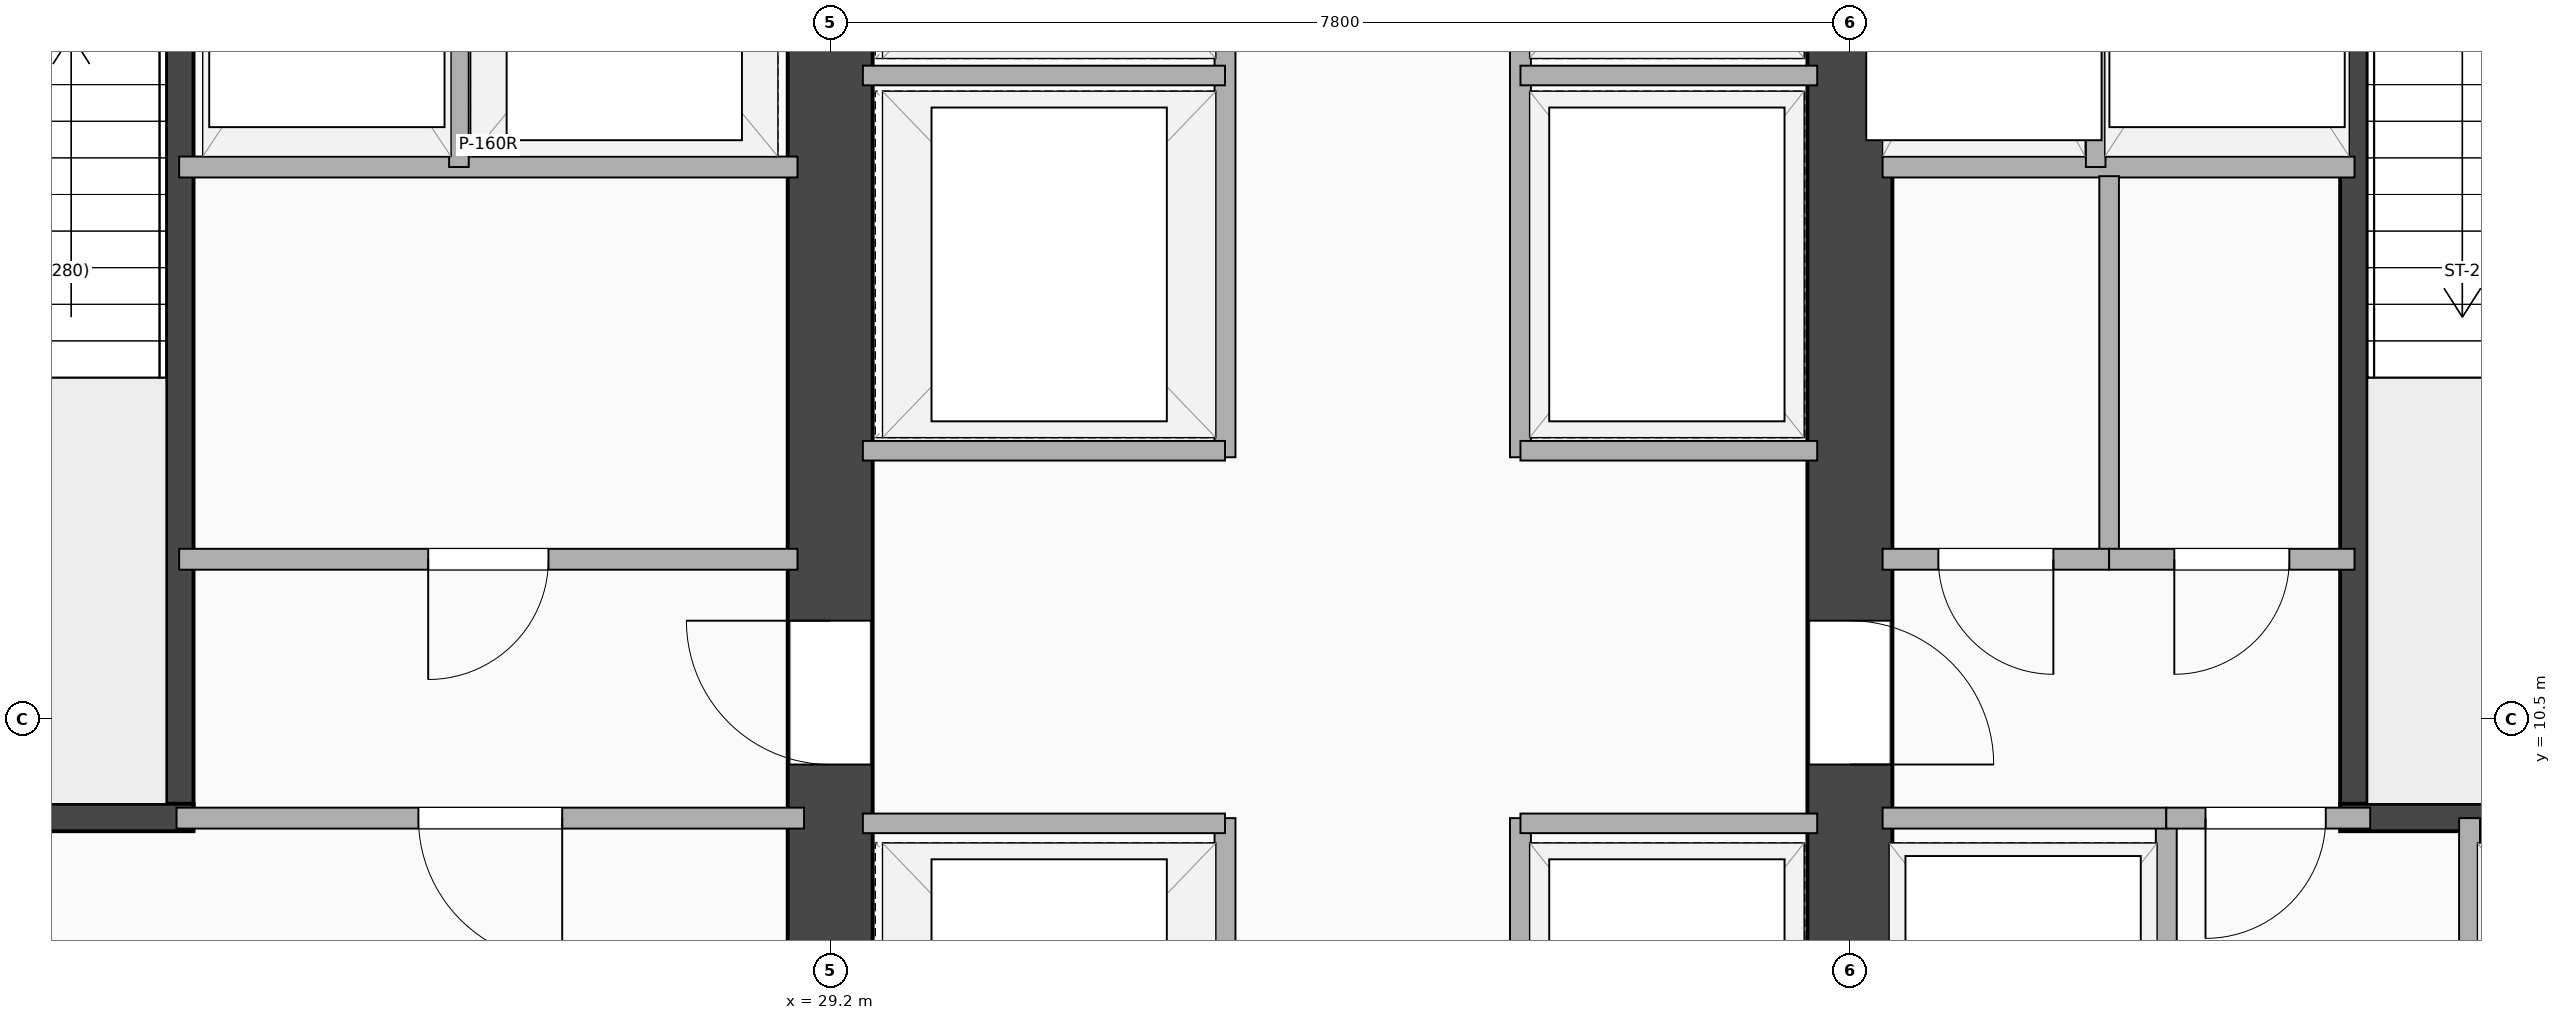
"""IFC4 building model, lengths in metres.
Left out: names, types, materials, properties, quantities, classifications, styles, units other than length and angle.
Written with IfcOpenShell. Run it as: python <this file> out.ifc"""

import sys

from ifc_helpers import new_model, si_unit, direction, frame, frame_2d, origin, place, context, subcontext, project, spatial, rectangle, extrude, element, fill, save


model = new_model("IFC4")
c1 = context("Model", 3, precision=1e-05, world=origin(), true_north=direction((0.0, 1.0)))
c2 = subcontext(c1, "Body", "Model", "MODEL_VIEW")
j1 = project(units=[si_unit("LENGTHUNIT", "METRE"), si_unit("PLANEANGLEUNIT", "RADIAN")], contexts=[c1])
p1 = place(None, origin())
s1 = spatial("IfcSite", under=j1, at=p1, CompositionType="ELEMENT")
p2 = place(p1, origin())
s2 = spatial("IfcBuilding", under=s1, at=p2, CompositionType="ELEMENT")
p3 = place(p2, frame((0.0, 0.0, 75.4)))
s3 = spatial("IfcBuildingStorey", under=s2, at=p3, CompositionType="ELEMENT", Elevation=75.4)
p4 = place(p3, frame((29.2, 3.5, 0.0), z_axis=(0.0, 0.0, 1.0), x_axis=(0.0, 1.0, 0.0)))
e1 = element("IfcWall", 1, at=p4, inside=s3, PredefinedType="SHEAR", context=c2, shape_type="SweptSolid", body=[
    extrude(rectangle(XDim=16.9, YDim=0.65, at=frame_2d((8.45, 0.0))), origin(), (0.0, 0.0, 1.0), 8.14),
])
p5 = place(p4, frame((7.75, 0.0, 0.0), z_axis=(0.0, 0.0, 1.0), x_axis=(-1.0, 0.0, 0.0)))
e2 = element("IfcOpeningElement", 2, at=p5, cuts=e1, PredefinedType="OPENING", context=c2, shape_type="SweptSolid", body=[
    extrude(rectangle(XDim=1.1, YDim=2.15, at=frame_2d((0.55, 1.075))), frame((0.0, 0.335, 0.0), z_axis=(0.0, -1.0, 0.0), x_axis=(1.0, 0.0, 0.0)), (0.0, 0.0, 1.0), 0.67),
])
p6 = place(p3, frame((37.0, 3.5, 0.0), z_axis=(0.0, 0.0, 1.0), x_axis=(0.0, 1.0, 0.0)))
e3 = element("IfcWall", 3, at=p6, inside=s3, PredefinedType="SHEAR", context=c2, shape_type="SweptSolid", body=[
    extrude(rectangle(XDim=16.9, YDim=0.65, at=frame_2d((8.45, 0.0))), origin(), (0.0, 0.0, 1.0), 8.14),
])
p7 = place(p6, frame((6.65, 0.0, 0.0)))
e4 = element("IfcOpeningElement", 4, at=p7, cuts=e3, PredefinedType="OPENING", context=c2, shape_type="SweptSolid", body=[
    extrude(rectangle(XDim=1.1, YDim=2.15, at=frame_2d((0.55, 1.075))), frame((0.0, 0.335, 0.0), z_axis=(0.0, -1.0, 0.0), x_axis=(1.0, 0.0, 0.0)), (0.0, 0.0, 1.0), 0.67),
])
p8 = place(p3, frame((24.225, 9.745, 0.0), z_axis=(0.0, 0.0, 1.0), x_axis=(0.0, 1.0, 0.0)))
e5 = element("IfcWall", 5, at=p8, inside=s3, PredefinedType="SHEAR", context=c2, shape_type="SweptSolid", body=[
    extrude(rectangle(XDim=8.01, YDim=0.21, at=frame_2d((4.005, 0.0))), origin(), (0.0, 0.0, 1.0), 8.14),
])
p9 = place(p3, frame((20.67, 9.745, 0.0), z_axis=(0.0, 0.0, 1.0), x_axis=(1.0, 0.0, 0.0)))
e6 = element("IfcWall", 6, at=p9, inside=s3, PredefinedType="SHEAR", context=c2, shape_type="SweptSolid", body=[
    extrude(rectangle(XDim=3.66, YDim=0.21, at=frame_2d((1.83, 0.0))), origin(), (0.0, 0.0, 1.0), 8.14),
])
p10 = place(p3, frame((40.855, 9.745, 0.0), z_axis=(0.0, 0.0, 1.0), x_axis=(0.0, 1.0, 0.0)))
e7 = element("IfcWall", 7, at=p10, inside=s3, PredefinedType="SHEAR", context=c2, shape_type="SweptSolid", body=[
    extrude(rectangle(XDim=8.01, YDim=0.21, at=frame_2d((4.005, 0.0))), origin(), (0.0, 0.0, 1.0), 8.14),
])
p11 = place(p3, frame((40.75, 9.745, 0.0), z_axis=(0.0, 0.0, 1.0), x_axis=(1.0, 0.0, 0.0)))
e8 = element("IfcWall", 8, at=p11, inside=s3, PredefinedType="SHEAR", context=c2, shape_type="SweptSolid", body=[
    extrude(rectangle(XDim=3.66, YDim=0.21, at=frame_2d((1.83, 0.0))), origin(), (0.0, 0.0, 1.0), 8.14),
])
p12 = place(p3, frame((24.22, 14.72, 0.0), z_axis=(0.0, 0.0, 1.0), x_axis=(1.0, 0.0, 0.0)))
e9 = element("IfcWall", 9, at=p12, inside=s3, PredefinedType="PARTITIONING", context=c2, shape_type="SweptSolid", body=[
    extrude(rectangle(XDim=4.73, YDim=0.16, at=frame_2d((2.365, 0.0))), origin(), (0.0, 0.0, 1.0), 8.14),
])
p13 = place(p3, frame((26.36, 14.72, 0.0), z_axis=(0.0, 0.0, 1.0), x_axis=(0.0, 1.0, 0.0)))
e10 = element("IfcWall", 10, at=p13, inside=s3, PredefinedType="PARTITIONING", context=c2, shape_type="SweptSolid", body=[
    extrude(rectangle(XDim=3.04, YDim=0.15, at=frame_2d((1.52, 0.0))), origin(), (0.0, 0.0, 1.0), 8.14),
])
p14 = place(p3, frame((37.25, 14.72, 0.0), z_axis=(0.0, 0.0, 1.0), x_axis=(1.0, 0.0, 0.0)))
e11 = element("IfcWall", 11, at=p14, inside=s3, PredefinedType="PARTITIONING", context=c2, shape_type="SweptSolid", body=[
    extrude(rectangle(XDim=3.61, YDim=0.16, at=frame_2d((1.805, 0.0))), origin(), (0.0, 0.0, 1.0), 8.14),
])
p15 = place(p3, frame((38.88, 14.72, 0.0), z_axis=(0.0, 0.0, 1.0), x_axis=(0.0, 1.0, 0.0)))
e12 = element("IfcWall", 12, at=p15, inside=s3, PredefinedType="PARTITIONING", context=c2, shape_type="SweptSolid", body=[
    extrude(rectangle(XDim=3.04, YDim=0.15, at=frame_2d((1.52, 0.0))), origin(), (0.0, 0.0, 1.0), 8.14),
])
p16 = place(p3, frame((24.22, 11.72, 0.0), z_axis=(0.0, 0.0, 1.0), x_axis=(1.0, 0.0, 0.0)))
e13 = element("IfcWall", 13, at=p16, inside=s3, PredefinedType="PARTITIONING", context=c2, shape_type="SweptSolid", body=[
    extrude(rectangle(XDim=4.73, YDim=0.16, at=frame_2d((2.365, 0.0))), origin(), (0.0, 0.0, 1.0), 8.14),
])
p17 = place(p16, frame((1.905, 0.0, 0.0)))
e14 = element("IfcOpeningElement", 14, at=p17, cuts=e13, PredefinedType="OPENING", context=c2, shape_type="SweptSolid", body=[
    extrude(rectangle(XDim=0.92, YDim=2.08, at=frame_2d((0.46, 1.04))), frame((0.0, 0.09, 0.0), z_axis=(0.0, -1.0, 0.0), x_axis=(1.0, 0.0, 0.0)), (0.0, 0.0, 1.0), 0.18),
])
p18 = place(p3, frame((38.983, 11.72, 0.0), z_axis=(0.0, 0.0, 1.0), x_axis=(0.0, 1.0, 0.0)))
e15 = element("IfcWall", 15, at=p18, inside=s3, PredefinedType="PARTITIONING", context=c2, shape_type="SweptSolid", body=[
    extrude(rectangle(XDim=2.93, YDim=0.15, at=frame_2d((1.465, 0.0))), origin(), (0.0, 0.0, 1.0), 8.14),
])
p19 = place(p3, frame((37.25, 11.72, 0.0), z_axis=(0.0, 0.0, 1.0), x_axis=(1.0, 0.0, 0.0)))
e16 = element("IfcWall", 16, at=p19, inside=s3, PredefinedType="PARTITIONING", context=c2, shape_type="SweptSolid", body=[
    extrude(rectangle(XDim=1.733, YDim=0.16, at=frame_2d((0.866, 0.0))), origin(), (0.0, 0.0, 1.0), 8.14),
])
p20 = place(p19, frame((0.427, 0.0, 0.0)))
e17 = element("IfcOpeningElement", 17, at=p20, cuts=e16, PredefinedType="OPENING", context=c2, shape_type="SweptSolid", body=[
    extrude(rectangle(XDim=0.88, YDim=2.08, at=frame_2d((0.44, 1.04))), frame((0.0, 0.09, 0.0), z_axis=(0.0, -1.0, 0.0), x_axis=(1.0, 0.0, 0.0)), (0.0, 0.0, 1.0), 0.18),
])
p21 = place(p3, frame((38.983, 11.72, 0.0), z_axis=(0.0, 0.0, 1.0), x_axis=(1.0, 0.0, 0.0)))
e18 = element("IfcWall", 18, at=p21, inside=s3, PredefinedType="PARTITIONING", context=c2, shape_type="SweptSolid", body=[
    extrude(rectangle(XDim=1.877, YDim=0.16, at=frame_2d((0.938, 0.0))), origin(), (0.0, 0.0, 1.0), 8.14),
])
p22 = place(p21, frame((0.499, 0.0, 0.0)))
e19 = element("IfcOpeningElement", 19, at=p22, cuts=e18, PredefinedType="OPENING", context=c2, shape_type="SweptSolid", body=[
    extrude(rectangle(XDim=0.88, YDim=2.08, at=frame_2d((0.44, 1.04))), frame((0.0, 0.09, 0.0), z_axis=(0.0, -1.0, 0.0), x_axis=(1.0, 0.0, 0.0)), (0.0, 0.0, 1.0), 0.18),
])
p23 = place(p3, frame((24.2, 9.74, 0.0), z_axis=(0.0, 0.0, 1.0), x_axis=(1.0, 0.0, 0.0)))
e20 = element("IfcWall", 20, at=p23, inside=s3, PredefinedType="PARTITIONING", context=c2, shape_type="SweptSolid", body=[
    extrude(rectangle(XDim=4.8, YDim=0.16, at=frame_2d((2.4, 0.0))), origin(), (0.0, 0.0, 1.0), 8.14),
])
p24 = place(p23, frame((1.85, 0.0, 0.0)))
e21 = element("IfcOpeningElement", 21, at=p24, cuts=e20, PredefinedType="OPENING", context=c2, shape_type="SweptSolid", body=[
    extrude(rectangle(XDim=1.1, YDim=2.15, at=frame_2d((0.55, 1.075))), frame((0.0, 0.09, 0.0), z_axis=(0.0, -1.0, 0.0), x_axis=(1.0, 0.0, 0.0)), (0.0, 0.0, 1.0), 0.18),
])
for number, where, z_axis, x_axis in (
    (22, (39.42, 3.9, 0.0), (0.0, 0.0, 1.0), (0.0, 1.0, 0.0)),
    (23, (41.74, 3.9, 0.0), (0.0, 0.0, 1.0), (0.0, 1.0, 0.0)),
):
    element("IfcWall", number, at=place(p3, frame(where, z_axis=z_axis, x_axis=x_axis)), inside=s3, PredefinedType="PARTITIONING", context=c2, shape_type="SweptSolid", body=[
        extrude(rectangle(XDim=5.84, YDim=0.16, at=frame_2d((2.92, 0.0))), origin(), (0.0, 0.0, 1.0), 8.14),
    ])
p25 = place(p3, frame((37.25, 9.74, 0.0), z_axis=(0.0, 0.0, 1.0), x_axis=(1.0, 0.0, 0.0)))
e24 = element("IfcWall", 24, at=p25, inside=s3, PredefinedType="PARTITIONING", context=c2, shape_type="SweptSolid", body=[
    extrude(rectangle(XDim=2.17, YDim=0.16, at=frame_2d((1.085, 0.0))), origin(), (0.0, 0.0, 1.0), 8.14),
])
p26 = place(p3, frame((39.42, 9.74, 0.0), z_axis=(0.0, 0.0, 1.0), x_axis=(1.0, 0.0, 0.0)))
e25 = element("IfcWall", 25, at=p26, inside=s3, PredefinedType="PARTITIONING", context=c2, shape_type="SweptSolid", body=[
    extrude(rectangle(XDim=1.56, YDim=0.16, at=frame_2d((0.78, 0.0))), origin(), (0.0, 0.0, 1.0), 8.14),
])
p27 = place(p26, frame((0.3, 0.0, 0.0)))
e26 = element("IfcOpeningElement", 26, at=p27, cuts=e25, PredefinedType="OPENING", context=c2, shape_type="SweptSolid", body=[
    extrude(rectangle(XDim=0.92, YDim=2.08, at=frame_2d((0.46, 1.04))), frame((0.0, 0.09, 0.0), z_axis=(0.0, -1.0, 0.0), x_axis=(1.0, 0.0, 0.0)), (0.0, 0.0, 1.0), 0.18),
])
for number, where, z_axis, x_axis in (
    (27, (32.22, 3.9, 0.0), (0.0, 0.0, 1.0), (0.0, 1.0, 0.0)),
    (28, (34.48, 3.9, 0.0), (0.0, 0.0, 1.0), (0.0, 1.0, 0.0)),
):
    element("IfcWall", number, at=place(p3, frame(where, z_axis=z_axis, x_axis=x_axis)), inside=s3, PredefinedType="PARTITIONING", context=c2, shape_type="SweptSolid", body=[
        extrude(rectangle(XDim=5.84, YDim=0.16, at=frame_2d((2.92, 0.0))), origin(), (0.0, 0.0, 1.0), 8.14),
    ])
p28 = place(p3, frame((29.45, 9.7, 0.0), z_axis=(0.0, 0.0, 1.0), x_axis=(1.0, 0.0, 0.0)))
e29 = element("IfcWall", 29, at=p28, inside=s3, PredefinedType="PARTITIONING", context=c2, shape_type="SweptSolid", body=[
    extrude(rectangle(XDim=2.77, YDim=0.15, at=frame_2d((1.385, 0.0))), origin(), (0.0, 0.0, 1.0), 8.14),
])
p29 = place(p3, frame((34.48, 9.7, 0.0), z_axis=(0.0, 0.0, 1.0), x_axis=(1.0, 0.0, 0.0)))
e30 = element("IfcWall", 30, at=p29, inside=s3, PredefinedType="PARTITIONING", context=c2, shape_type="SweptSolid", body=[
    extrude(rectangle(XDim=2.27, YDim=0.15, at=frame_2d((1.135, 0.0))), origin(), (0.0, 0.0, 1.0), 8.14),
])
p30 = place(p3, frame((32.22, 12.5, 0.0), z_axis=(0.0, 0.0, 1.0), x_axis=(0.0, 1.0, 0.0)))
e31 = element("IfcWall", 31, at=p30, inside=s3, PredefinedType="PARTITIONING", context=c2, shape_type="SweptSolid", body=[
    extrude(rectangle(XDim=7.92, YDim=0.16, at=frame_2d((3.96, 0.0))), origin(), (0.0, 0.0, 1.0), 7.43),
])
p31 = place(p30, frame((6.1, 0.0, 0.0)))
e32 = element("IfcOpeningElement", 32, at=p31, cuts=e31, PredefinedType="OPENING", context=c2, shape_type="SweptSolid", body=[
    extrude(rectangle(XDim=0.88, YDim=2.08, at=frame_2d((0.44, 1.04))), frame((0.0, 0.09, 0.0), z_axis=(0.0, -1.0, 0.0), x_axis=(1.0, 0.0, 0.0)), (0.0, 0.0, 1.0), 0.18),
])
p32 = place(p3, frame((34.48, 12.5, 0.0), z_axis=(0.0, 0.0, 1.0), x_axis=(0.0, 1.0, 0.0)))
e33 = element("IfcWall", 33, at=p32, inside=s3, PredefinedType="PARTITIONING", context=c2, shape_type="SweptSolid", body=[
    extrude(rectangle(XDim=7.92, YDim=0.16, at=frame_2d((3.96, 0.0))), origin(), (0.0, 0.0, 1.0), 7.43),
])
p33 = place(p32, frame((6.98, 0.0, 0.0), z_axis=(0.0, 0.0, 1.0), x_axis=(-1.0, 0.0, 0.0)))
e34 = element("IfcOpeningElement", 34, at=p33, cuts=e33, PredefinedType="OPENING", context=c2, shape_type="SweptSolid", body=[
    extrude(rectangle(XDim=0.88, YDim=2.08, at=frame_2d((0.44, 1.04))), frame((0.0, 0.09, 0.0), z_axis=(0.0, -1.0, 0.0), x_axis=(1.0, 0.0, 0.0)), (0.0, 0.0, 1.0), 0.18),
])
p34 = place(p3, frame((29.45, 12.55, 0.0), z_axis=(0.0, 0.0, 1.0), x_axis=(1.0, 0.0, 0.0)))
e35 = element("IfcWall", 35, at=p34, inside=s3, PredefinedType="PARTITIONING", context=c2, shape_type="SweptSolid", body=[
    extrude(rectangle(XDim=2.77, YDim=0.15, at=frame_2d((1.385, 0.0))), origin(), (0.0, 0.0, 1.0), 8.14),
])
p35 = place(p3, frame((34.48, 12.55, 0.0), z_axis=(0.0, 0.0, 1.0), x_axis=(1.0, 0.0, 0.0)))
e36 = element("IfcWall", 36, at=p35, inside=s3, PredefinedType="PARTITIONING", context=c2, shape_type="SweptSolid", body=[
    extrude(rectangle(XDim=2.27, YDim=0.15, at=frame_2d((1.135, 0.0))), origin(), (0.0, 0.0, 1.0), 8.14),
])
p36 = place(p3, frame((29.45, 15.42, 0.0), z_axis=(0.0, 0.0, 1.0), x_axis=(1.0, 0.0, 0.0)))
e37 = element("IfcWall", 37, at=p36, inside=s3, PredefinedType="PARTITIONING", context=c2, shape_type="SweptSolid", body=[
    extrude(rectangle(XDim=2.77, YDim=0.15, at=frame_2d((1.385, 0.0))), origin(), (0.0, 0.0, 1.0), 8.14),
])
p37 = place(p3, frame((34.48, 15.42, 0.0), z_axis=(0.0, 0.0, 1.0), x_axis=(1.0, 0.0, 0.0)))
e38 = element("IfcWall", 38, at=p37, inside=s3, PredefinedType="PARTITIONING", context=c2, shape_type="SweptSolid", body=[
    extrude(rectangle(XDim=2.27, YDim=0.15, at=frame_2d((1.135, 0.0))), origin(), (0.0, 0.0, 1.0), 8.14),
])
p38 = place(p5, origin())
e39 = element("IfcDoor", 39, at=p38, inside=s3, OperationType="SINGLE_SWING_RIGHT", PredefinedType="DOOR", context=c2, shape_type="SweptSolid", body=[
    extrude(rectangle(XDim=1.1, YDim=2.15, at=frame_2d((0.55, 1.075))), frame((0.0, 0.025, 0.0), z_axis=(0.0, -1.0, 0.0), x_axis=(1.0, 0.0, 0.0)), (0.0, 0.0, 1.0), 0.05),
])
fill(e2, e39)
p39 = place(p7, origin())
e40 = element("IfcDoor", 40, at=p39, inside=s3, OperationType="SINGLE_SWING_LEFT", PredefinedType="DOOR", context=c2, shape_type="SweptSolid", body=[
    extrude(rectangle(XDim=1.1, YDim=2.15, at=frame_2d((0.55, 1.075))), frame((0.0, 0.025, 0.0), z_axis=(0.0, -1.0, 0.0), x_axis=(1.0, 0.0, 0.0)), (0.0, 0.0, 1.0), 0.05),
])
fill(e4, e40)
p40 = place(p17, origin())
e41 = element("IfcDoor", 41, at=p40, inside=s3, OperationType="SINGLE_SWING_LEFT", PredefinedType="DOOR", context=c2, shape_type="SweptSolid", body=[
    extrude(rectangle(XDim=0.92, YDim=2.08, at=frame_2d((0.46, 1.04))), frame((0.0, 0.025, 0.0), z_axis=(0.0, -1.0, 0.0), x_axis=(1.0, 0.0, 0.0)), (0.0, 0.0, 1.0), 0.05),
])
fill(e14, e41)
p41 = place(p20, origin())
e42 = element("IfcDoor", 42, at=p41, inside=s3, OperationType="SINGLE_SWING_RIGHT", PredefinedType="DOOR", context=c2, shape_type="SweptSolid", body=[
    extrude(rectangle(XDim=0.88, YDim=2.08, at=frame_2d((0.44, 1.04))), frame((0.0, 0.025, 0.0), z_axis=(0.0, -1.0, 0.0), x_axis=(1.0, 0.0, 0.0)), (0.0, 0.0, 1.0), 0.05),
])
fill(e17, e42)
p42 = place(p22, origin())
e43 = element("IfcDoor", 43, at=p42, inside=s3, OperationType="SINGLE_SWING_LEFT", PredefinedType="DOOR", context=c2, shape_type="SweptSolid", body=[
    extrude(rectangle(XDim=0.88, YDim=2.08, at=frame_2d((0.44, 1.04))), frame((0.0, 0.025, 0.0), z_axis=(0.0, -1.0, 0.0), x_axis=(1.0, 0.0, 0.0)), (0.0, 0.0, 1.0), 0.05),
])
fill(e19, e43)
p43 = place(p24, origin())
e44 = element("IfcDoor", 44, at=p43, inside=s3, OperationType="SINGLE_SWING_RIGHT", PredefinedType="DOOR", context=c2, shape_type="SweptSolid", body=[
    extrude(rectangle(XDim=1.1, YDim=2.15, at=frame_2d((0.55, 1.075))), frame((0.0, 0.025, 0.0), z_axis=(0.0, -1.0, 0.0), x_axis=(1.0, 0.0, 0.0)), (0.0, 0.0, 1.0), 0.05),
])
fill(e21, e44)
p44 = place(p27, origin())
e45 = element("IfcDoor", 45, at=p44, inside=s3, OperationType="SINGLE_SWING_LEFT", PredefinedType="DOOR", context=c2, shape_type="SweptSolid", body=[
    extrude(rectangle(XDim=0.92, YDim=2.08, at=frame_2d((0.46, 1.04))), frame((0.0, 0.025, 0.0), z_axis=(0.0, -1.0, 0.0), x_axis=(1.0, 0.0, 0.0)), (0.0, 0.0, 1.0), 0.05),
])
fill(e26, e45)
save(model, sys.argv[1])
